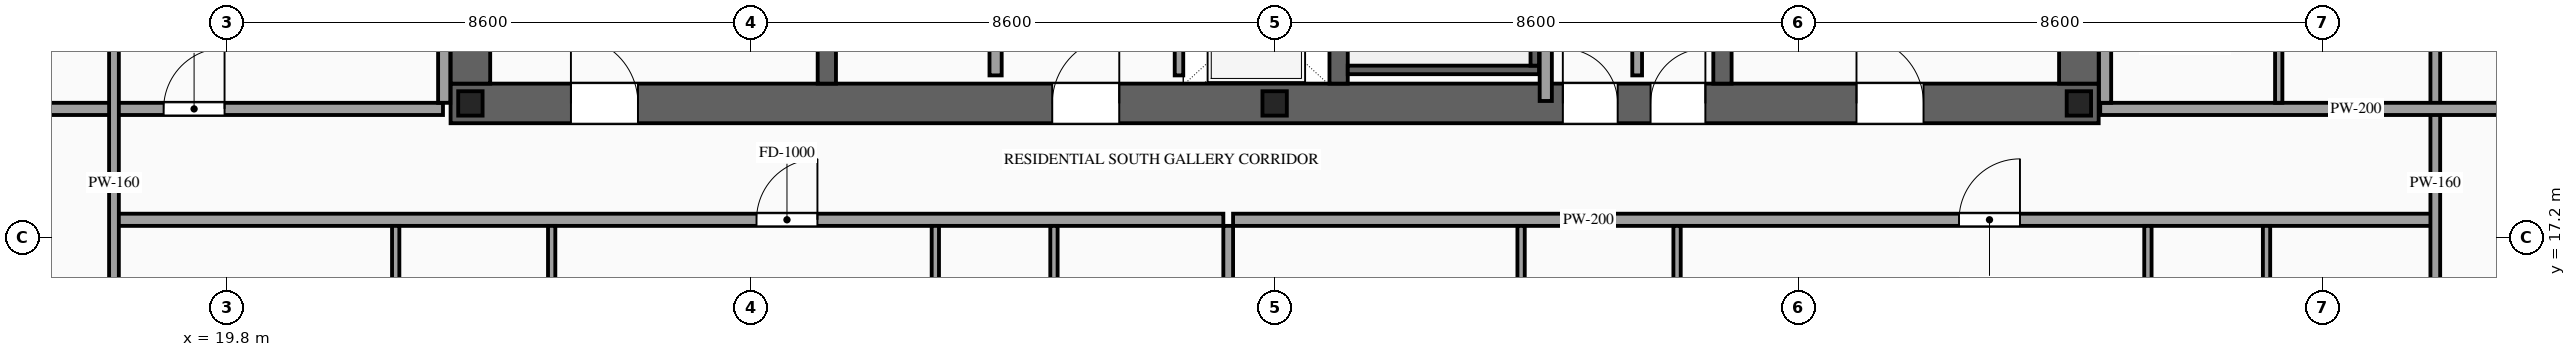
"""IFC4 building model, lengths in metres.
Left out: names, types, materials, properties, quantities, classifications, styles, units other than length and angle.
Written with IfcOpenShell. Run it as: python <this file> out.ifc"""

import sys

from ifc_helpers import new_model, si_unit, direction, frame, frame_2d, origin, origin_2d, place, context, subcontext, project, spatial, rectangle, i_section, extrude, source, transform, mapped, element, fill, save


model = new_model("IFC4")
c1 = context("Model", 3, precision=1e-05, world=origin(), true_north=direction((0.0, 1.0)))
c2 = subcontext(c1, "Body", "Model", "MODEL_VIEW")
j1 = project(units=[si_unit("LENGTHUNIT", "METRE"), si_unit("PLANEANGLEUNIT", "RADIAN")], contexts=[c1])
p1 = place(None, origin())
s1 = spatial("IfcSite", under=j1, at=p1, CompositionType="ELEMENT")
p2 = place(p1, origin())
s2 = spatial("IfcBuilding", under=s1, at=p2, CompositionType="ELEMENT")
p3 = place(p2, frame((0.0, 0.0, 198.5)))
s3 = spatial("IfcBuildingStorey", under=s2, at=p3, CompositionType="ELEMENT", Elevation=198.5)
p4 = place(p3, frame((23.475, 19.4, 0.0), z_axis=(0.0, 0.0, 1.0), x_axis=(1.0, 0.0, 0.0)))
e1 = element("IfcWall", 1, at=p4, inside=s3, PredefinedType="SHEAR", context=c2, shape_type="SweptSolid", body=[
    extrude(rectangle(XDim=27.05, YDim=0.65, at=frame_2d((13.525, 0.0))), origin(), (0.0, 0.0, 1.0), 3.5),
])
p5 = place(p4, frame((1.975, 0.0, 0.0)))
e2 = element("IfcOpeningElement", 2, at=p5, cuts=e1, PredefinedType="OPENING", context=c2, shape_type="SweptSolid", body=[
    extrude(rectangle(XDim=1.1, YDim=2.2, at=frame_2d((0.55, 1.1))), frame((0.0, 0.34, 0.0), z_axis=(0.0, -1.0, 0.0), x_axis=(1.0, 0.0, 0.0)), (0.0, 0.0, 1.0), 0.68),
])
p6 = place(p4, frame((9.875, 0.0, 0.0)))
e3 = element("IfcOpeningElement", 3, at=p6, cuts=e1, PredefinedType="OPENING", context=c2, shape_type="SweptSolid", body=[
    extrude(rectangle(XDim=1.1, YDim=2.2, at=frame_2d((0.55, 1.1))), frame((0.0, 0.34, 0.0), z_axis=(0.0, -1.0, 0.0), x_axis=(1.0, 0.0, 0.0)), (0.0, 0.0, 1.0), 0.68),
])
p7 = place(p4, frame((23.075, 0.0, 0.0)))
e4 = element("IfcOpeningElement", 4, at=p7, cuts=e1, PredefinedType="OPENING", context=c2, shape_type="SweptSolid", body=[
    extrude(rectangle(XDim=1.1, YDim=2.2, at=frame_2d((0.55, 1.1))), frame((0.0, 0.34, 0.0), z_axis=(0.0, -1.0, 0.0), x_axis=(1.0, 0.0, 0.0)), (0.0, 0.0, 1.0), 0.68),
])
p8 = place(p4, frame((19.695, 0.0, 0.0)))
e5 = element("IfcOpeningElement", 5, at=p8, cuts=e1, PredefinedType="OPENING", context=c2, shape_type="SweptSolid", body=[
    extrude(rectangle(XDim=0.9, YDim=2.15, at=frame_2d((0.45, 1.075))), frame((0.0, 0.34, 0.0), z_axis=(0.0, -1.0, 0.0), x_axis=(1.0, 0.0, 0.0)), (0.0, 0.0, 1.0), 0.68),
])
p9 = place(p4, frame((18.255, 0.0, 0.0)))
e6 = element("IfcOpeningElement", 6, at=p9, cuts=e1, PredefinedType="OPENING", context=c2, shape_type="SweptSolid", body=[
    extrude(rectangle(XDim=0.9, YDim=2.15, at=frame_2d((0.45, 1.075))), frame((0.0, 0.34, 0.0), z_axis=(0.0, -1.0, 0.0), x_axis=(1.0, 0.0, 0.0)), (0.0, 0.0, 1.0), 0.68),
])
m1 = source(origin(), c2, "Body", "SweptSolid", [
    extrude(rectangle(XDim=12.15, YDim=0.65, at=frame_2d((6.075, 0.0))), origin(), (0.0, 0.0, 1.0), 3.5),
])
for number, where, z_axis, x_axis in (
    (7, (23.8, 19.725, 0.0), (0.0, 0.0, 1.0), (0.0, 1.0, 0.0)),
    (8, (50.2, 19.725, 0.0), (0.0, 0.0, 1.0), (0.0, 1.0, 0.0)),
):
    element("IfcWall", number, at=place(p3, frame(where, z_axis=z_axis, x_axis=x_axis)), inside=s3, PredefinedType="SHEAR", context=c2, shape_type="MappedRepresentation", body=[
        mapped(m1, transform((0.0, 0.0, 0.0), scale=1.0)),
    ])
m2 = source(origin(), c2, "Body", "SweptSolid", [
    extrude(rectangle(XDim=12.15, YDim=0.3, at=frame_2d((6.075, 0.0))), origin(), (0.0, 0.0, 1.0), 3.5),
])
for number, where, z_axis, x_axis in (
    (9, (29.65, 19.725, 0.0), (0.0, 0.0, 1.0), (0.0, 1.0, 0.0)),
    (10, (38.05, 19.725, 0.0), (0.0, 0.0, 1.0), (0.0, 1.0, 0.0)),
    (11, (44.35, 19.725, 0.0), (0.0, 0.0, 1.0), (0.0, 1.0, 0.0)),
):
    element("IfcWall", number, at=place(p3, frame(where, z_axis=z_axis, x_axis=x_axis)), inside=s3, PredefinedType="SOLIDWALL", context=c2, shape_type="MappedRepresentation", body=[
        mapped(m2, transform((0.0, 0.0, 0.0), scale=1.0)),
    ])
m3 = source(origin(), c2, "Body", "SweptSolid", [
    extrude(i_section(OverallWidth=0.4, OverallDepth=0.4, WebThickness=0.013, FlangeThickness=0.021, at=origin_2d()), origin(), (0.0, 0.0, 1.0), 3.5),
])
for number, where, z_axis, x_axis in (
    (12, (23.8, 19.4, 0.0), (0.0, 0.0, 1.0), (1.0, 0.0, 0.0)),
    (13, (37.0, 19.4, 0.0), (0.0, 0.0, 1.0), (1.0, 0.0, 0.0)),
    (14, (50.2, 19.4, 0.0), (0.0, 0.0, 1.0), (1.0, 0.0, 0.0)),
):
    element("IfcColumn", number, at=place(p3, frame(where, z_axis=z_axis, x_axis=x_axis)), inside=s3, PredefinedType="COLUMN", context=c2, shape_type="MappedRepresentation", body=[
        mapped(m3, transform((0.0, 0.0, 0.0), scale=1.0)),
    ])
p10 = place(p3, frame((35.43, 19.86, 0.0), z_axis=(0.0, 0.0, 1.0), x_axis=(0.0, 1.0, 0.0)))
e15 = element("IfcWall", 15, at=p10, inside=s3, PredefinedType="SOLIDWALL", context=c2, shape_type="SweptSolid", body=[
    extrude(rectangle(XDim=2.04, YDim=0.14, at=frame_2d((1.02, 0.0))), origin(), (0.0, 0.0, 1.0), 3.28),
])
p11 = place(p10, frame((0.47, 0.0, 0.0)))
e16 = element("IfcOpeningElement", 16, at=p11, cuts=e15, PredefinedType="OPENING", context=c2, shape_type="SweptSolid", body=[
    extrude(rectangle(XDim=1.1, YDim=2.2, at=frame_2d((0.55, 1.1))), frame((0.0, 0.085, 0.0), z_axis=(0.0, -1.0, 0.0), x_axis=(1.0, 0.0, 0.0)), (0.0, 0.0, 1.0), 0.17),
])
m4 = source(origin(), c2, "Body", "SweptSolid", [
    extrude(rectangle(XDim=3.14, YDim=0.14, at=frame_2d((1.57, 0.0))), origin(), (0.0, 0.0, 1.0), 3.28),
])
p12 = place(p3, frame((38.2, 19.95, 0.0), z_axis=(0.0, 0.0, 1.0), x_axis=(1.0, 0.0, 0.0)))
e17 = element("IfcWall", 17, at=p12, inside=s3, PredefinedType="SOLIDWALL", context=c2, shape_type="MappedRepresentation", body=[
    mapped(m4, transform((0.0, 0.0, 0.0), scale=1.0)),
])
m5 = source(origin(), c2, "Body", "SweptSolid", [
    extrude(rectangle(XDim=8.94, YDim=0.14, at=frame_2d((4.47, 0.0))), origin(), (0.0, 0.0, 1.0), 3.28),
])
p13 = place(p3, frame((41.27, 20.02, 0.0), z_axis=(0.0, 0.0, 1.0), x_axis=(0.0, 1.0, 0.0)))
e18 = element("IfcWall", 18, at=p13, inside=s3, PredefinedType="SOLIDWALL", context=c2, shape_type="MappedRepresentation", body=[
    mapped(m5, transform((0.0, 0.0, 0.0), scale=1.0)),
])
p14 = place(p3, frame((32.42, 19.86, 0.0), z_axis=(0.0, 0.0, 1.0), x_axis=(0.0, 1.0, 0.0)))
e19 = element("IfcWall", 19, at=p14, inside=s3, PredefinedType="PARTITIONING", context=c2, shape_type="SweptSolid", body=[
    extrude(rectangle(XDim=7.94, YDim=0.2, at=frame_2d((3.97, 0.0))), origin(), (0.0, 0.0, 1.0), 3.28),
])
p15 = place(p14, frame((3.52, 0.0, 0.0)))
e20 = element("IfcOpeningElement", 20, at=p15, cuts=e19, PredefinedType="OPENING", context=c2, shape_type="SweptSolid", body=[
    extrude(rectangle(XDim=0.9, YDim=2.15, at=frame_2d((0.45, 1.075))), frame((0.0, 0.115, 0.0), z_axis=(0.0, -1.0, 0.0), x_axis=(1.0, 0.0, 0.0)), (0.0, 0.0, 1.0), 0.23),
])
m6 = source(origin(), c2, "Body", "SweptSolid", [
    extrude(rectangle(XDim=1.34, YDim=0.16, at=frame_2d((0.67, 0.0))), origin(), (0.0, 0.0, 1.0), 3.28),
])
p16 = place(p3, frame((42.95, 19.86, 0.0), z_axis=(0.0, 0.0, 1.0), x_axis=(0.0, 1.0, 0.0)))
e21 = element("IfcWall", 21, at=p16, inside=s3, PredefinedType="PARTITIONING", context=c2, shape_type="MappedRepresentation", body=[
    mapped(m6, transform((0.0, 0.0, 0.0), scale=1.0)),
])
m7 = source(origin(), c2, "Body", "SweptSolid", [
    extrude(rectangle(XDim=6.51, YDim=0.2, at=frame_2d((3.255, 0.0))), origin(), (0.0, 0.0, 1.0), 3.28),
])
p17 = place(p3, frame((41.45, 19.44, 0.0), z_axis=(0.0, 0.0, 1.0), x_axis=(0.0, 1.0, 0.0)))
e22 = element("IfcWall", 22, at=p17, inside=s3, PredefinedType="PARTITIONING", context=c2, shape_type="MappedRepresentation", body=[
    mapped(m7, transform((0.0, 0.0, 0.0), scale=1.0)),
])
p18 = place(p3, frame((17.94, 17.49, 0.0), z_axis=(0.0, 0.0, 1.0), x_axis=(1.0, 0.0, 0.0)))
e23 = element("IfcWall", 23, at=p18, inside=s3, PredefinedType="PARTITIONING", context=c2, shape_type="SweptSolid", body=[
    extrude(rectangle(XDim=18.218, YDim=0.2, at=frame_2d((9.109, 0.0))), origin(), (0.0, 0.0, 1.0), 3.28),
])
p19 = place(p18, frame((10.556, 0.0, 0.0)))
e24 = element("IfcOpeningElement", 24, at=p19, cuts=e23, PredefinedType="OPENING", context=c2, shape_type="SweptSolid", body=[
    extrude(rectangle(XDim=1.0, YDim=2.2, at=frame_2d((0.5, 1.1))), frame((0.0, 0.115, 0.0), z_axis=(0.0, -1.0, 0.0), x_axis=(1.0, 0.0, 0.0)), (0.0, 0.0, 1.0), 0.23),
])
m8 = source(origin(), c2, "Body", "SweptSolid", [
    extrude(rectangle(XDim=13.54, YDim=0.16, at=frame_2d((6.77, 0.0))), origin(), (0.0, 0.0, 1.0), 3.28),
])
p20 = place(p3, frame((36.238, 3.85, 0.0), z_axis=(0.0, 0.0, 1.0), x_axis=(0.0, 1.0, 0.0)))
e25 = element("IfcWall", 25, at=p20, inside=s3, PredefinedType="PARTITIONING", context=c2, shape_type="MappedRepresentation", body=[
    mapped(m8, transform((0.0, 0.0, 0.0), scale=1.0)),
])
m9 = source(origin(), c2, "Body", "SweptSolid", [
    extrude(rectangle(XDim=5.61, YDim=0.12, at=frame_2d((2.805, 0.0))), origin(), (0.0, 0.0, 1.0), 3.28),
])
p21 = place(p3, frame((22.574, 11.78, 0.0), z_axis=(0.0, 0.0, 1.0), x_axis=(0.0, 1.0, 0.0)))
e26 = element("IfcWall", 26, at=p21, inside=s3, PredefinedType="PARTITIONING", context=c2, shape_type="MappedRepresentation", body=[
    mapped(m9, transform((0.0, 0.0, 0.0), scale=1.0)),
])
p22 = place(p3, frame((25.134, 11.78, 0.0), z_axis=(0.0, 0.0, 1.0), x_axis=(0.0, 1.0, 0.0)))
e27 = element("IfcWall", 27, at=p22, inside=s3, PredefinedType="PARTITIONING", context=c2, shape_type="SweptSolid", body=[
    extrude(rectangle(XDim=5.61, YDim=0.12, at=frame_2d((2.805, 0.0))), origin(), (0.0, 0.0, 1.0), 3.28),
])
p23 = place(p22, frame((2.38, 0.0, 0.0)))
e28 = element("IfcOpeningElement", 28, at=p23, cuts=e27, PredefinedType="OPENING", context=c2, shape_type="SweptSolid", body=[
    extrude(rectangle(XDim=0.85, YDim=2.1, at=frame_2d((0.425, 1.05))), frame((0.0, 0.075, 0.0), z_axis=(0.0, -1.0, 0.0), x_axis=(1.0, 0.0, 0.0)), (0.0, 0.0, 1.0), 0.15),
])
for number, where, z_axis, x_axis in (
    (29, (33.378, 11.78, 0.0), (0.0, 0.0, 1.0), (0.0, 1.0, 0.0)),
    (30, (31.431, 11.78, 0.0), (0.0, 0.0, 1.0), (0.0, 1.0, 0.0)),
):
    element("IfcWall", number, at=place(p3, frame(where, z_axis=z_axis, x_axis=x_axis)), inside=s3, PredefinedType="PARTITIONING", context=c2, shape_type="MappedRepresentation", body=[
        mapped(m9, transform((0.0, 0.0, 0.0), scale=1.0)),
    ])
p24 = place(p3, frame((36.318, 17.49, 0.0), z_axis=(0.0, 0.0, 1.0), x_axis=(1.0, 0.0, 0.0)))
e31 = element("IfcWall", 31, at=p24, inside=s3, PredefinedType="PARTITIONING", context=c2, shape_type="SweptSolid", body=[
    extrude(rectangle(XDim=19.742, YDim=0.2, at=frame_2d((9.871, 0.0))), origin(), (0.0, 0.0, 1.0), 3.28),
])
p25 = place(p24, frame((11.915, 0.0, 0.0)))
e32 = element("IfcOpeningElement", 32, at=p25, cuts=e31, PredefinedType="OPENING", context=c2, shape_type="SweptSolid", body=[
    extrude(rectangle(XDim=1.0, YDim=2.2, at=frame_2d((0.5, 1.1))), frame((0.0, 0.115, 0.0), z_axis=(0.0, -1.0, 0.0), x_axis=(1.0, 0.0, 0.0)), (0.0, 0.0, 1.0), 0.23),
])
p26 = place(p3, frame((41.045, 11.78, 0.0), z_axis=(0.0, 0.0, 1.0), x_axis=(0.0, 1.0, 0.0)))
e33 = element("IfcWall", 33, at=p26, inside=s3, PredefinedType="PARTITIONING", context=c2, shape_type="MappedRepresentation", body=[
    mapped(m9, transform((0.0, 0.0, 0.0), scale=1.0)),
])
p27 = place(p3, frame((43.605, 11.78, 0.0), z_axis=(0.0, 0.0, 1.0), x_axis=(0.0, 1.0, 0.0)))
e34 = element("IfcWall", 34, at=p27, inside=s3, PredefinedType="PARTITIONING", context=c2, shape_type="SweptSolid", body=[
    extrude(rectangle(XDim=5.61, YDim=0.12, at=frame_2d((2.805, 0.0))), origin(), (0.0, 0.0, 1.0), 3.28),
])
p28 = place(p27, frame((2.38, 0.0, 0.0)))
e35 = element("IfcOpeningElement", 35, at=p28, cuts=e34, PredefinedType="OPENING", context=c2, shape_type="SweptSolid", body=[
    extrude(rectangle(XDim=0.85, YDim=2.1, at=frame_2d((0.425, 1.05))), frame((0.0, 0.075, 0.0), z_axis=(0.0, -1.0, 0.0), x_axis=(1.0, 0.0, 0.0)), (0.0, 0.0, 1.0), 0.15),
])
for number, where, z_axis, x_axis in (
    (36, (53.28, 11.78, 0.0), (0.0, 0.0, 1.0), (0.0, 1.0, 0.0)),
    (37, (51.333, 11.78, 0.0), (0.0, 0.0, 1.0), (0.0, 1.0, 0.0)),
):
    element("IfcWall", number, at=place(p3, frame(where, z_axis=z_axis, x_axis=x_axis)), inside=s3, PredefinedType="PARTITIONING", context=c2, shape_type="MappedRepresentation", body=[
        mapped(m9, transform((0.0, 0.0, 0.0), scale=1.0)),
    ])
p29 = place(p3, frame((15.05, 19.31, 0.0), z_axis=(0.0, 0.0, 1.0), x_axis=(1.0, 0.0, 0.0)))
e38 = element("IfcWall", 38, at=p29, inside=s3, PredefinedType="PARTITIONING", context=c2, shape_type="SweptSolid", body=[
    extrude(rectangle(XDim=8.3, YDim=0.2, at=frame_2d((4.15, 0.0))), origin(), (0.0, 0.0, 1.0), 2.775),
])
p30 = place(p29, frame((3.715, 0.0, 0.0)))
e39 = element("IfcOpeningElement", 39, at=p30, cuts=e38, PredefinedType="OPENING", context=c2, shape_type="SweptSolid", body=[
    extrude(rectangle(XDim=1.0, YDim=2.2, at=frame_2d((0.5, 1.1))), frame((0.0, 0.115, 0.0), z_axis=(0.0, -1.0, 0.0), x_axis=(1.0, 0.0, 0.0)), (0.0, 0.0, 1.0), 0.23),
])
m10 = source(origin(), c2, "Body", "SweptSolid", [
    extrude(rectangle(XDim=6.29, YDim=0.2, at=frame_2d((3.145, 0.0))), origin(), (0.0, 0.0, 1.0), 3.28),
])
p31 = place(p3, frame((23.37, 19.41, 0.0), z_axis=(0.0, 0.0, 1.0), x_axis=(0.0, 1.0, 0.0)))
e40 = element("IfcWall", 40, at=p31, inside=s3, PredefinedType="PARTITIONING", context=c2, shape_type="MappedRepresentation", body=[
    mapped(m10, transform((0.0, 0.0, 0.0), scale=1.0)),
])
m11 = source(origin(), c2, "Body", "SweptSolid", [
    extrude(rectangle(XDim=28.19, YDim=0.16, at=frame_2d((14.095, 0.0))), origin(), (0.0, 0.0, 1.0), 3.28),
])
for number, where, z_axis, x_axis in (
    (41, (17.95, 4.0, 0.0), (0.0, 0.0, 1.0), (0.0, 1.0, 0.0)),
    (42, (56.05, 4.0, 0.0), (0.0, 0.0, 1.0), (0.0, 1.0, 0.0)),
):
    element("IfcWall", number, at=place(p3, frame(where, z_axis=z_axis, x_axis=x_axis)), inside=s3, PredefinedType="PARTITIONING", context=c2, shape_type="MappedRepresentation", body=[
        mapped(m11, transform((0.0, 0.0, 0.0), scale=1.0)),
    ])
m12 = source(origin(), c2, "Body", "SweptSolid", [
    extrude(rectangle(XDim=8.4, YDim=0.2, at=frame_2d((4.2, 0.0))), origin(), (0.0, 0.0, 1.0), 2.775),
])
p32 = place(p3, frame((50.55, 19.31, 0.0), z_axis=(0.0, 0.0, 1.0), x_axis=(1.0, 0.0, 0.0)))
e43 = element("IfcWall", 43, at=p32, inside=s3, PredefinedType="PARTITIONING", context=c2, shape_type="MappedRepresentation", body=[
    mapped(m12, transform((0.0, 0.0, 0.0), scale=1.0)),
])
m13 = source(origin(), c2, "Body", "SweptSolid", [
    extrude(rectangle(XDim=12.78, YDim=0.2, at=frame_2d((6.39, 0.0))), origin(), (0.0, 0.0, 1.0), 3.28),
])
p33 = place(p3, frame((50.63, 19.41, 0.0), z_axis=(0.0, 0.0, 1.0), x_axis=(0.0, 1.0, 0.0)))
e44 = element("IfcWall", 44, at=p33, inside=s3, PredefinedType="PARTITIONING", context=c2, shape_type="MappedRepresentation", body=[
    mapped(m13, transform((0.0, 0.0, 0.0), scale=1.0)),
])
p34 = place(p3, frame((53.48, 19.41, 0.0), z_axis=(0.0, 0.0, 1.0), x_axis=(0.0, 1.0, 0.0)))
e45 = element("IfcWall", 45, at=p34, inside=s3, PredefinedType="PARTITIONING", context=c2, shape_type="SweptSolid", body=[
    extrude(rectangle(XDim=5.623, YDim=0.12, at=frame_2d((2.812, 0.0))), origin(), (0.0, 0.0, 1.0), 3.28),
])
p35 = place(p34, frame((2.386, 0.0, 0.0)))
e46 = element("IfcOpeningElement", 46, at=p35, cuts=e45, PredefinedType="OPENING", context=c2, shape_type="SweptSolid", body=[
    extrude(rectangle(XDim=0.85, YDim=2.1, at=frame_2d((0.425, 1.05))), frame((0.0, 0.075, 0.0), z_axis=(0.0, -1.0, 0.0), x_axis=(1.0, 0.0, 0.0)), (0.0, 0.0, 1.0), 0.15),
])
m14 = source(origin(), c2, "Body", "SweptSolid", [
    extrude(rectangle(XDim=1.1, YDim=2.2, at=frame_2d((0.55, 1.1))), frame((0.0, 0.025, 0.0), z_axis=(0.0, -1.0, 0.0), x_axis=(1.0, 0.0, 0.0)), (0.0, 0.0, 1.0), 0.05),
])
p36 = place(p5, origin())
e47 = element("IfcDoor", 47, at=p36, inside=s3, OperationType="SINGLE_SWING_LEFT", PredefinedType="DOOR", context=c2, shape_type="MappedRepresentation", body=[
    mapped(m14, transform((0.0, 0.0, 0.0), scale=1.0)),
])
fill(e2, e47)
p37 = place(p6, origin())
e48 = element("IfcDoor", 48, at=p37, inside=s3, OperationType="SINGLE_SWING_RIGHT", PredefinedType="DOOR", context=c2, shape_type="MappedRepresentation", body=[
    mapped(m14, transform((0.0, 0.0, 0.0), scale=1.0)),
])
fill(e3, e48)
p38 = place(p7, origin())
e49 = element("IfcDoor", 49, at=p38, inside=s3, OperationType="SINGLE_SWING_LEFT", PredefinedType="DOOR", context=c2, shape_type="MappedRepresentation", body=[
    mapped(m14, transform((0.0, 0.0, 0.0), scale=1.0)),
])
fill(e4, e49)
m15 = source(origin(), c2, "Body", "SweptSolid", [
    extrude(rectangle(XDim=0.9, YDim=2.15, at=frame_2d((0.45, 1.075))), frame((0.0, 0.025, 0.0), z_axis=(0.0, -1.0, 0.0), x_axis=(1.0, 0.0, 0.0)), (0.0, 0.0, 1.0), 0.05),
])
p39 = place(p8, origin())
e50 = element("IfcDoor", 50, at=p39, inside=s3, OperationType="SINGLE_SWING_RIGHT", PredefinedType="DOOR", context=c2, shape_type="MappedRepresentation", body=[
    mapped(m15, transform((0.0, 0.0, 0.0), scale=1.0)),
])
fill(e5, e50)
p40 = place(p9, origin())
e51 = element("IfcDoor", 51, at=p40, inside=s3, OperationType="SINGLE_SWING_LEFT", PredefinedType="DOOR", context=c2, shape_type="MappedRepresentation", body=[
    mapped(m15, transform((0.0, 0.0, 0.0), scale=1.0)),
])
fill(e6, e51)
m16 = source(origin(), c2, "Body", "SweptSolid", [
    extrude(rectangle(XDim=1.0, YDim=2.2, at=frame_2d((0.5, 1.1))), frame((0.0, 0.025, 0.0), z_axis=(0.0, -1.0, 0.0), x_axis=(1.0, 0.0, 0.0)), (0.0, 0.0, 1.0), 0.05),
])
p41 = place(p19, origin())
e52 = element("IfcDoor", 52, at=p41, inside=s3, OperationType="SINGLE_SWING_RIGHT", PredefinedType="DOOR", context=c2, shape_type="MappedRepresentation", body=[
    mapped(m16, transform((0.0, 0.0, 0.0), scale=1.0)),
])
fill(e24, e52)
p42 = place(p25, origin())
e53 = element("IfcDoor", 53, at=p42, inside=s3, OperationType="SINGLE_SWING_RIGHT", PredefinedType="DOOR", context=c2, shape_type="MappedRepresentation", body=[
    mapped(m16, transform((0.0, 0.0, 0.0), scale=1.0)),
])
fill(e32, e53)
p43 = place(p30, origin())
e54 = element("IfcDoor", 54, at=p43, inside=s3, OperationType="SINGLE_SWING_RIGHT", PredefinedType="DOOR", context=c2, shape_type="MappedRepresentation", body=[
    mapped(m16, transform((0.0, 0.0, 0.0), scale=1.0)),
])
fill(e39, e54)
save(model, sys.argv[1])
